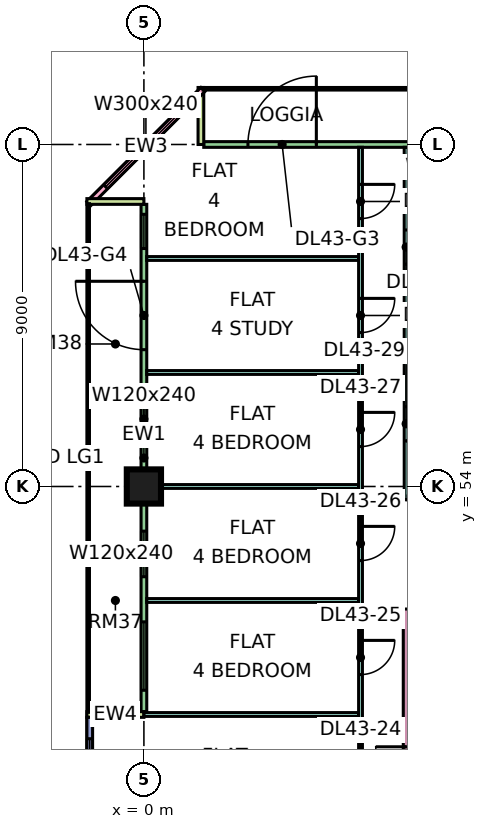
"""IFC4 building model, lengths in metres.
Left out: names, types, materials, properties, quantities, classifications, styles, units other than length and angle.
Written with IfcOpenShell. Run it as: python <this file> out.ifc"""

import sys

from ifc_helpers import new_model, si_unit, direction, frame, frame_2d, origin, origin_2d, place, context, subcontext, project, spatial, rectangle, extrude, element, fill, save


model = new_model("IFC4")
c1 = context("Model", 3, precision=1e-05, world=origin(), true_north=direction((0.0, 1.0)))
c2 = subcontext(c1, "Body", "Model", "MODEL_VIEW")
j1 = project(units=[si_unit("LENGTHUNIT", "METRE"), si_unit("PLANEANGLEUNIT", "RADIAN")], contexts=[c1])
p1 = place(None, origin())
s1 = spatial("IfcSite", under=j1, at=p1, CompositionType="ELEMENT")
p2 = place(p1, origin())
s2 = spatial("IfcBuilding", under=s1, at=p2, CompositionType="ELEMENT")
p3 = place(p2, frame((0.0, 0.0, 187.4)))
s3 = spatial("IfcBuildingStorey", under=s2, at=p3, CompositionType="ELEMENT", Elevation=187.4)
p4 = place(p3, frame((0.0, 54.0, 0.0), z_axis=(0.0, 0.0, 1.0), x_axis=(1.0, 0.0, 0.0)))
e1 = element("IfcColumn", 1, at=p4, inside=s3, PredefinedType="COLUMN", context=c2, shape_type="SweptSolid", body=[
    extrude(rectangle(XDim=0.9, YDim=0.9, at=origin_2d()), origin(), (0.0, 0.0, 1.0), 3.75),
])
p5 = place(p3, frame((11.925, 63.0, 0.0), z_axis=(0.0, 0.0, 1.0), x_axis=(-1.0, 0.0, 0.0)))
e2 = element("IfcWall", 2, at=p5, inside=s3, PredefinedType="SOLIDWALL", context=c2, shape_type="SweptSolid", body=[
    extrude(rectangle(XDim=10.35, YDim=0.15, at=frame_2d((5.175, 0.0))), origin(), (0.0, 0.0, 1.0), 3.35),
])
p6 = place(p5, frame((2.775, 0.0, 0.45)))
e3 = element("IfcOpeningElement", 3, at=p6, cuts=e2, PredefinedType="OPENING", context=c2, shape_type="SweptSolid", body=[
    extrude(rectangle(XDim=1.8, YDim=2.4, at=frame_2d((0.9, 1.2))), frame((0.0, 0.085, 0.0), z_axis=(0.0, -1.0, 0.0), x_axis=(1.0, 0.0, 0.0)), (0.0, 0.0, 1.0), 0.17),
])
p7 = place(p5, frame((7.387, 0.0, 0.0)))
e4 = element("IfcOpeningElement", 4, at=p7, cuts=e2, PredefinedType="OPENING", context=c2, shape_type="SweptSolid", body=[
    extrude(rectangle(XDim=1.8, YDim=2.4, at=frame_2d((0.9, 1.2))), frame((0.0, 0.085, 0.0), z_axis=(0.0, -1.0, 0.0), x_axis=(1.0, 0.0, 0.0)), (0.0, 0.0, 1.0), 0.17),
])
p8 = place(p3, frame((1.5, 64.5, 0.0), z_axis=(0.0, 0.0, 1.0), x_axis=(0.0, -1.0, 0.0)))
e5 = element("IfcWall", 5, at=p8, inside=s3, PredefinedType="SOLIDWALL", context=c2, shape_type="SweptSolid", body=[
    extrude(rectangle(XDim=1.5, YDim=0.15, at=frame_2d((0.75, 0.0))), origin(), (0.0, 0.0, 1.0), 3.35),
])
p9 = place(p3, frame((1.553, 64.447, 0.0), z_axis=(0.0, 0.0, 1.0), x_axis=(-0.707106781187, -0.707106781187, 0.0)))
e6 = element("IfcWall", 6, at=p9, inside=s3, PredefinedType="SOLIDWALL", context=c2, shape_type="SweptSolid", body=[
    extrude(rectangle(XDim=4.243, YDim=0.15, at=frame_2d((2.121, 0.0))), origin(), (0.0, 0.0, 1.0), 3.35),
])
p10 = place(p9, frame((0.621, 0.0, 0.45)))
e7 = element("IfcOpeningElement", 7, at=p10, cuts=e6, PredefinedType="OPENING", context=c2, shape_type="SweptSolid", body=[
    extrude(rectangle(XDim=3.0, YDim=2.4, at=frame_2d((1.5, 1.2))), frame((0.0, 0.085, 0.0), z_axis=(0.0, -1.0, 0.0), x_axis=(1.0, 0.0, 0.0)), (0.0, 0.0, 1.0), 0.17),
])
p11 = place(p3, frame((0.0, 61.425, 0.0), z_axis=(0.0, 0.0, 1.0), x_axis=(0.0, -1.0, 0.0)))
e8 = element("IfcWall", 8, at=p11, inside=s3, PredefinedType="SOLIDWALL", context=c2, shape_type="SweptSolid", body=[
    extrude(rectangle(XDim=13.35, YDim=0.15, at=frame_2d((6.675, 0.0))), origin(), (0.0, 0.0, 1.0), 3.35),
])
p12 = place(p11, frame((0.262, 0.0, 0.45)))
e9 = element("IfcOpeningElement", 9, at=p12, cuts=e8, PredefinedType="OPENING", context=c2, shape_type="SweptSolid", body=[
    extrude(rectangle(XDim=0.9, YDim=2.4, at=frame_2d((0.45, 1.2))), frame((0.0, 0.085, 0.0), z_axis=(0.0, -1.0, 0.0), x_axis=(1.0, 0.0, 0.0)), (0.0, 0.0, 1.0), 0.17),
])
p13 = place(p11, frame((2.025, 0.0, 0.0)))
e10 = element("IfcOpeningElement", 10, at=p13, cuts=e8, PredefinedType="OPENING", context=c2, shape_type="SweptSolid", body=[
    extrude(rectangle(XDim=1.8, YDim=2.4, at=frame_2d((0.9, 1.2))), frame((0.0, 0.085, 0.0), z_axis=(0.0, -1.0, 0.0), x_axis=(1.0, 0.0, 0.0)), (0.0, 0.0, 1.0), 0.17),
])
p14 = place(p11, frame((5.05, 0.0, 0.45)))
e11 = element("IfcOpeningElement", 11, at=p14, cuts=e8, PredefinedType="OPENING", context=c2, shape_type="SweptSolid", body=[
    extrude(rectangle(XDim=1.2, YDim=2.4, at=frame_2d((0.6, 1.2))), frame((0.0, 0.085, 0.0), z_axis=(0.0, -1.0, 0.0), x_axis=(1.0, 0.0, 0.0)), (0.0, 0.0, 1.0), 0.17),
])
p15 = place(p11, frame((8.6, 0.0, 0.45)))
e12 = element("IfcOpeningElement", 12, at=p15, cuts=e8, PredefinedType="OPENING", context=c2, shape_type="SweptSolid", body=[
    extrude(rectangle(XDim=1.2, YDim=2.4, at=frame_2d((0.6, 1.2))), frame((0.0, 0.085, 0.0), z_axis=(0.0, -1.0, 0.0), x_axis=(1.0, 0.0, 0.0)), (0.0, 0.0, 1.0), 0.17),
])
p16 = place(p11, frame((10.988, 0.0, 0.45)))
e13 = element("IfcOpeningElement", 13, at=p16, cuts=e8, PredefinedType="OPENING", context=c2, shape_type="SweptSolid", body=[
    extrude(rectangle(XDim=1.8, YDim=2.4, at=frame_2d((0.9, 1.2))), frame((0.0, 0.085, 0.0), z_axis=(0.0, -1.0, 0.0), x_axis=(1.0, 0.0, 0.0)), (0.0, 0.0, 1.0), 0.17),
])
for number, where, z_axis, x_axis in (
    (14, (-1.5, 61.5, 0.0), (0.0, 0.0, 1.0), (1.0, 0.0, 0.0)),
    (15, (-1.5, 48.0, 0.0), (0.0, 0.0, 1.0), (1.0, 0.0, 0.0)),
):
    element("IfcWall", number, at=place(p3, frame(where, z_axis=z_axis, x_axis=x_axis)), inside=s3, PredefinedType="SOLIDWALL", context=c2, shape_type="SweptSolid", body=[
        extrude(rectangle(XDim=1.5, YDim=0.15, at=frame_2d((0.75, 0.0))), origin(), (0.0, 0.0, 1.0), 3.35),
    ])
p17 = place(p3, frame((-1.425, 47.925, 0.0), z_axis=(0.0, 0.0, 1.0), x_axis=(0.0, -1.0, 0.0)))
e16 = element("IfcWall", 16, at=p17, inside=s3, PredefinedType="SOLIDWALL", context=c2, shape_type="SweptSolid", body=[
    extrude(rectangle(XDim=11.85, YDim=0.15, at=frame_2d((5.925, 0.0))), origin(), (0.0, 0.0, 1.0), 3.35),
])
p18 = place(p17, frame((0.562, 0.0, 0.45)))
e17 = element("IfcOpeningElement", 17, at=p18, cuts=e16, PredefinedType="OPENING", context=c2, shape_type="SweptSolid", body=[
    extrude(rectangle(XDim=1.8, YDim=2.4, at=frame_2d((0.9, 1.2))), frame((0.0, 0.085, 0.0), z_axis=(0.0, -1.0, 0.0), x_axis=(1.0, 0.0, 0.0)), (0.0, 0.0, 1.0), 0.17),
])
p19 = place(p17, frame((5.887, 0.0, 0.45)))
e18 = element("IfcOpeningElement", 18, at=p19, cuts=e16, PredefinedType="OPENING", context=c2, shape_type="SweptSolid", body=[
    extrude(rectangle(XDim=3.0, YDim=2.4, at=frame_2d((1.5, 1.2))), frame((0.0, 0.085, 0.0), z_axis=(0.0, -1.0, 0.0), x_axis=(1.0, 0.0, 0.0)), (0.0, 0.0, 1.0), 0.17),
])
p20 = place(p3, frame((0.0, 48.0, 0.0), z_axis=(0.0, 0.0, 1.0), x_axis=(1.0, 0.0, 0.0)))
e19 = element("IfcWall", 19, at=p20, inside=s3, PredefinedType="PARTITIONING", context=c2, shape_type="SweptSolid", body=[
    extrude(rectangle(XDim=5.65, YDim=0.1, at=frame_2d((2.825, 0.0))), origin(), (0.0, 0.0, 1.0), 3.35),
])
for number, where, z_axis, x_axis in (
    (20, (0.074, 51.0, 0.0), (0.0, 0.0, 1.0), (1.0, 0.0, 0.0)),
    (21, (0.074, 54.0, 0.0), (0.0, 0.0, 1.0), (1.0, 0.0, 0.0)),
    (22, (0.074, 57.0, 0.0), (0.0, 0.0, 1.0), (1.0, 0.0, 0.0)),
    (23, (0.074, 60.0, 0.0), (0.0, 0.0, 1.0), (1.0, 0.0, 0.0)),
):
    element("IfcWall", number, at=place(p3, frame(where, z_axis=z_axis, x_axis=x_axis)), inside=s3, PredefinedType="PARTITIONING", context=c2, shape_type="SweptSolid", body=[
        extrude(rectangle(XDim=5.576, YDim=0.1, at=frame_2d((2.788, 0.0))), origin(), (0.0, 0.0, 1.0), 3.35),
    ])
p21 = place(p3, frame((5.7, 36.1, 0.0), z_axis=(0.0, 0.0, 1.0), x_axis=(0.0, 1.0, 0.0)))
e24 = element("IfcWall", 24, at=p21, inside=s3, PredefinedType="PARTITIONING", context=c2, shape_type="SweptSolid", body=[
    extrude(rectangle(XDim=26.826, YDim=0.1, at=frame_2d((13.413, 0.0))), origin(), (0.0, 0.0, 1.0), 3.35),
])
p22 = place(p21, frame((9.95, 0.0, 0.0)))
e25 = element("IfcOpeningElement", 25, at=p22, cuts=e24, PredefinedType="OPENING", context=c2, shape_type="SweptSolid", body=[
    extrude(rectangle(XDim=0.9, YDim=2.1, at=frame_2d((0.45, 1.05))), frame((0.0, 0.06, 0.0), z_axis=(0.0, -1.0, 0.0), x_axis=(1.0, 0.0, 0.0)), (0.0, 0.0, 1.0), 0.12),
])
p23 = place(p21, frame((12.95, 0.0, 0.0)))
e26 = element("IfcOpeningElement", 26, at=p23, cuts=e24, PredefinedType="OPENING", context=c2, shape_type="SweptSolid", body=[
    extrude(rectangle(XDim=0.9, YDim=2.1, at=frame_2d((0.45, 1.05))), frame((0.0, 0.06, 0.0), z_axis=(0.0, -1.0, 0.0), x_axis=(1.0, 0.0, 0.0)), (0.0, 0.0, 1.0), 0.12),
])
p24 = place(p21, frame((15.95, 0.0, 0.0)))
e27 = element("IfcOpeningElement", 27, at=p24, cuts=e24, PredefinedType="OPENING", context=c2, shape_type="SweptSolid", body=[
    extrude(rectangle(XDim=0.9, YDim=2.1, at=frame_2d((0.45, 1.05))), frame((0.0, 0.06, 0.0), z_axis=(0.0, -1.0, 0.0), x_axis=(1.0, 0.0, 0.0)), (0.0, 0.0, 1.0), 0.12),
])
p25 = place(p21, frame((18.95, 0.0, 0.0)))
e28 = element("IfcOpeningElement", 28, at=p25, cuts=e24, PredefinedType="OPENING", context=c2, shape_type="SweptSolid", body=[
    extrude(rectangle(XDim=0.9, YDim=2.1, at=frame_2d((0.45, 1.05))), frame((0.0, 0.06, 0.0), z_axis=(0.0, -1.0, 0.0), x_axis=(1.0, 0.0, 0.0)), (0.0, 0.0, 1.0), 0.12),
])
p26 = place(p21, frame((24.95, 0.0, 0.0)))
e29 = element("IfcOpeningElement", 29, at=p26, cuts=e24, PredefinedType="OPENING", context=c2, shape_type="SweptSolid", body=[
    extrude(rectangle(XDim=0.9, YDim=2.1, at=frame_2d((0.45, 1.05))), frame((0.0, 0.06, 0.0), z_axis=(0.0, -1.0, 0.0), x_axis=(1.0, 0.0, 0.0)), (0.0, 0.0, 1.0), 0.12),
])
p27 = place(p21, frame((3.95, 0.0, 0.0)))
e30 = element("IfcOpeningElement", 30, at=p27, cuts=e24, PredefinedType="OPENING", context=c2, shape_type="SweptSolid", body=[
    extrude(rectangle(XDim=0.9, YDim=2.1, at=frame_2d((0.45, 1.05))), frame((0.0, 0.06, 0.0), z_axis=(0.0, -1.0, 0.0), x_axis=(1.0, 0.0, 0.0)), (0.0, 0.0, 1.0), 0.12),
])
p28 = place(p21, frame((21.95, 0.0, 0.0)))
e31 = element("IfcOpeningElement", 31, at=p28, cuts=e24, PredefinedType="OPENING", context=c2, shape_type="SweptSolid", body=[
    extrude(rectangle(XDim=0.9, YDim=2.1, at=frame_2d((0.45, 1.05))), frame((0.0, 0.06, 0.0), z_axis=(0.0, -1.0, 0.0), x_axis=(1.0, 0.0, 0.0)), (0.0, 0.0, 1.0), 0.12),
])
p29 = place(p3, frame((6.9, 36.1, 0.0), z_axis=(0.0, 0.0, 1.0), x_axis=(0.0, 1.0, 0.0)))
e32 = element("IfcWall", 32, at=p29, inside=s3, PredefinedType="PARTITIONING", context=c2, shape_type="SweptSolid", body=[
    extrude(rectangle(XDim=14.675, YDim=0.15, at=frame_2d((7.337, 0.0))), origin(), (0.0, 0.0, 1.0), 3.35),
])
p30 = place(p29, frame((7.55, 0.0, 0.0)))
e33 = element("IfcOpeningElement", 33, at=p30, cuts=e32, PredefinedType="OPENING", context=c2, shape_type="SweptSolid", body=[
    extrude(rectangle(XDim=0.8, YDim=2.1, at=frame_2d((0.4, 1.05))), frame((0.0, 0.085, 0.0), z_axis=(0.0, -1.0, 0.0), x_axis=(1.0, 0.0, 0.0)), (0.0, 0.0, 1.0), 0.17),
])
p31 = place(p29, frame((0.65, 0.0, 0.0)))
e34 = element("IfcOpeningElement", 34, at=p31, cuts=e32, PredefinedType="OPENING", context=c2, shape_type="SweptSolid", body=[
    extrude(rectangle(XDim=0.8, YDim=2.1, at=frame_2d((0.4, 1.05))), frame((0.0, 0.085, 0.0), z_axis=(0.0, -1.0, 0.0), x_axis=(1.0, 0.0, 0.0)), (0.0, 0.0, 1.0), 0.17),
])
p32 = place(p29, frame((10.25, 0.0, 0.0)))
e35 = element("IfcOpeningElement", 35, at=p32, cuts=e32, PredefinedType="OPENING", context=c2, shape_type="SweptSolid", body=[
    extrude(rectangle(XDim=0.8, YDim=2.1, at=frame_2d((0.4, 1.05))), frame((0.0, 0.085, 0.0), z_axis=(0.0, -1.0, 0.0), x_axis=(1.0, 0.0, 0.0)), (0.0, 0.0, 1.0), 0.17),
])
p33 = place(p29, frame((3.95, 0.0, 0.0)))
e36 = element("IfcOpeningElement", 36, at=p33, cuts=e32, PredefinedType="OPENING", context=c2, shape_type="SweptSolid", body=[
    extrude(rectangle(XDim=0.9, YDim=2.1, at=frame_2d((0.45, 1.05))), frame((0.0, 0.085, 0.0), z_axis=(0.0, -1.0, 0.0), x_axis=(1.0, 0.0, 0.0)), (0.0, 0.0, 1.0), 0.17),
])
p34 = place(p3, frame((6.9, 53.65, 0.0), z_axis=(0.0, 0.0, 1.0), x_axis=(0.0, 1.0, 0.0)))
e37 = element("IfcWall", 37, at=p34, inside=s3, PredefinedType="PARTITIONING", context=c2, shape_type="SweptSolid", body=[
    extrude(rectangle(XDim=9.276, YDim=0.1, at=frame_2d((4.638, 0.0))), origin(), (0.0, 0.0, 1.0), 3.35),
])
p35 = place(p34, frame((1.55, 0.0, 0.0)))
e38 = element("IfcOpeningElement", 38, at=p35, cuts=e37, PredefinedType="OPENING", context=c2, shape_type="SweptSolid", body=[
    extrude(rectangle(XDim=0.9, YDim=2.1, at=frame_2d((0.45, 1.05))), frame((0.0, 0.06, 0.0), z_axis=(0.0, -1.0, 0.0), x_axis=(1.0, 0.0, 0.0)), (0.0, 0.0, 1.0), 0.12),
])
p36 = place(p34, frame((6.2, 0.0, 0.0)))
e39 = element("IfcOpeningElement", 39, at=p36, cuts=e37, PredefinedType="OPENING", context=c2, shape_type="SweptSolid", body=[
    extrude(rectangle(XDim=0.9, YDim=2.1, at=frame_2d((0.45, 1.05))), frame((0.0, 0.06, 0.0), z_axis=(0.0, -1.0, 0.0), x_axis=(1.0, 0.0, 0.0)), (0.0, 0.0, 1.0), 0.12),
])
p37 = place(p7, frame((1.8, 0.0, 0.0), z_axis=(0.0, 0.0, 1.0), x_axis=(-1.0, 0.0, 0.0)))
e40 = element("IfcDoor", 40, at=p37, inside=s3, OperationType="DOUBLE_DOOR_SINGLE_SWING", PredefinedType="DOOR", context=c2, shape_type="SweptSolid", body=[
    extrude(rectangle(XDim=1.8, YDim=2.4, at=frame_2d((0.9, 1.2))), frame((0.0, 0.025, 0.0), z_axis=(0.0, -1.0, 0.0), x_axis=(1.0, 0.0, 0.0)), (0.0, 0.0, 1.0), 0.05),
])
fill(e4, e40)
p38 = place(p10, origin())
e41 = element("IfcWindow", 41, at=p38, inside=s3, PartitioningType="SINGLE_PANEL", PredefinedType="WINDOW", context=c2, shape_type="SweptSolid", body=[
    extrude(rectangle(XDim=3.0, YDim=2.4, at=frame_2d((1.5, 1.2))), frame((0.0, 0.03, 0.0), z_axis=(0.0, -1.0, 0.0), x_axis=(1.0, 0.0, 0.0)), (0.0, 0.0, 1.0), 0.06),
])
fill(e7, e41)
p39 = place(p12, origin())
e42 = element("IfcWindow", 42, at=p39, inside=s3, PartitioningType="SINGLE_PANEL", PredefinedType="WINDOW", context=c2, shape_type="SweptSolid", body=[
    extrude(rectangle(XDim=0.9, YDim=2.4, at=frame_2d((0.45, 1.2))), frame((0.0, 0.03, 0.0), z_axis=(0.0, -1.0, 0.0), x_axis=(1.0, 0.0, 0.0)), (0.0, 0.0, 1.0), 0.06),
])
fill(e9, e42)
p40 = place(p13, frame((1.8, 0.0, 0.0), z_axis=(0.0, 0.0, 1.0), x_axis=(-1.0, 0.0, 0.0)))
e43 = element("IfcDoor", 43, at=p40, inside=s3, OperationType="DOUBLE_DOOR_SINGLE_SWING", PredefinedType="DOOR", context=c2, shape_type="SweptSolid", body=[
    extrude(rectangle(XDim=1.8, YDim=2.4, at=frame_2d((0.9, 1.2))), frame((0.0, 0.025, 0.0), z_axis=(0.0, -1.0, 0.0), x_axis=(1.0, 0.0, 0.0)), (0.0, 0.0, 1.0), 0.05),
])
fill(e10, e43)
p41 = place(p14, origin())
e44 = element("IfcWindow", 44, at=p41, inside=s3, PartitioningType="SINGLE_PANEL", PredefinedType="WINDOW", context=c2, shape_type="SweptSolid", body=[
    extrude(rectangle(XDim=1.2, YDim=2.4, at=frame_2d((0.6, 1.2))), frame((0.0, 0.03, 0.0), z_axis=(0.0, -1.0, 0.0), x_axis=(1.0, 0.0, 0.0)), (0.0, 0.0, 1.0), 0.06),
])
fill(e11, e44)
p42 = place(p15, origin())
e45 = element("IfcWindow", 45, at=p42, inside=s3, PartitioningType="SINGLE_PANEL", PredefinedType="WINDOW", context=c2, shape_type="SweptSolid", body=[
    extrude(rectangle(XDim=1.2, YDim=2.4, at=frame_2d((0.6, 1.2))), frame((0.0, 0.03, 0.0), z_axis=(0.0, -1.0, 0.0), x_axis=(1.0, 0.0, 0.0)), (0.0, 0.0, 1.0), 0.06),
])
fill(e12, e45)
p43 = place(p16, origin())
e46 = element("IfcWindow", 46, at=p43, inside=s3, PartitioningType="SINGLE_PANEL", PredefinedType="WINDOW", context=c2, shape_type="SweptSolid", body=[
    extrude(rectangle(XDim=1.8, YDim=2.4, at=frame_2d((0.9, 1.2))), frame((0.0, 0.03, 0.0), z_axis=(0.0, -1.0, 0.0), x_axis=(1.0, 0.0, 0.0)), (0.0, 0.0, 1.0), 0.06),
])
fill(e13, e46)
p44 = place(p18, origin())
e47 = element("IfcWindow", 47, at=p44, inside=s3, PartitioningType="SINGLE_PANEL", PredefinedType="WINDOW", context=c2, shape_type="SweptSolid", body=[
    extrude(rectangle(XDim=1.8, YDim=2.4, at=frame_2d((0.9, 1.2))), frame((0.0, 0.03, 0.0), z_axis=(0.0, -1.0, 0.0), x_axis=(1.0, 0.0, 0.0)), (0.0, 0.0, 1.0), 0.06),
])
fill(e17, e47)
p45 = place(p23, origin())
e48 = element("IfcDoor", 48, at=p45, inside=s3, OperationType="SINGLE_SWING_RIGHT", PredefinedType="DOOR", context=c2, shape_type="SweptSolid", body=[
    extrude(rectangle(XDim=0.9, YDim=2.1, at=frame_2d((0.45, 1.05))), frame((0.0, 0.025, 0.0), z_axis=(0.0, -1.0, 0.0), x_axis=(1.0, 0.0, 0.0)), (0.0, 0.0, 1.0), 0.05),
])
fill(e26, e48)
p46 = place(p24, origin())
e49 = element("IfcDoor", 49, at=p46, inside=s3, OperationType="SINGLE_SWING_RIGHT", PredefinedType="DOOR", context=c2, shape_type="SweptSolid", body=[
    extrude(rectangle(XDim=0.9, YDim=2.1, at=frame_2d((0.45, 1.05))), frame((0.0, 0.025, 0.0), z_axis=(0.0, -1.0, 0.0), x_axis=(1.0, 0.0, 0.0)), (0.0, 0.0, 1.0), 0.05),
])
fill(e27, e49)
p47 = place(p25, origin())
e50 = element("IfcDoor", 50, at=p47, inside=s3, OperationType="SINGLE_SWING_RIGHT", PredefinedType="DOOR", context=c2, shape_type="SweptSolid", body=[
    extrude(rectangle(XDim=0.9, YDim=2.1, at=frame_2d((0.45, 1.05))), frame((0.0, 0.025, 0.0), z_axis=(0.0, -1.0, 0.0), x_axis=(1.0, 0.0, 0.0)), (0.0, 0.0, 1.0), 0.05),
])
fill(e28, e50)
p48 = place(p26, origin())
e51 = element("IfcDoor", 51, at=p48, inside=s3, OperationType="SINGLE_SWING_RIGHT", PredefinedType="DOOR", context=c2, shape_type="SweptSolid", body=[
    extrude(rectangle(XDim=0.9, YDim=2.1, at=frame_2d((0.45, 1.05))), frame((0.0, 0.025, 0.0), z_axis=(0.0, -1.0, 0.0), x_axis=(1.0, 0.0, 0.0)), (0.0, 0.0, 1.0), 0.05),
])
fill(e29, e51)
p49 = place(p35, frame((0.9, 0.0, 0.0), z_axis=(0.0, 0.0, 1.0), x_axis=(-1.0, 0.0, 0.0)))
e52 = element("IfcDoor", 52, at=p49, inside=s3, OperationType="SINGLE_SWING_LEFT", PredefinedType="DOOR", context=c2, shape_type="SweptSolid", body=[
    extrude(rectangle(XDim=0.9, YDim=2.1, at=frame_2d((0.45, 1.05))), frame((0.0, 0.025, 0.0), z_axis=(0.0, -1.0, 0.0), x_axis=(1.0, 0.0, 0.0)), (0.0, 0.0, 1.0), 0.05),
])
fill(e38, e52)
p50 = place(p36, frame((0.9, 0.0, 0.0), z_axis=(0.0, 0.0, 1.0), x_axis=(-1.0, 0.0, 0.0)))
e53 = element("IfcDoor", 53, at=p50, inside=s3, OperationType="SINGLE_SWING_LEFT", PredefinedType="DOOR", context=c2, shape_type="SweptSolid", body=[
    extrude(rectangle(XDim=0.9, YDim=2.1, at=frame_2d((0.45, 1.05))), frame((0.0, 0.025, 0.0), z_axis=(0.0, -1.0, 0.0), x_axis=(1.0, 0.0, 0.0)), (0.0, 0.0, 1.0), 0.05),
])
fill(e39, e53)
p51 = place(p32, frame((0.8, 0.0, 0.0), z_axis=(0.0, 0.0, 1.0), x_axis=(-1.0, 0.0, 0.0)))
e54 = element("IfcDoor", 54, at=p51, inside=s3, OperationType="SINGLE_SWING_RIGHT", PredefinedType="DOOR", context=c2, shape_type="SweptSolid", body=[
    extrude(rectangle(XDim=0.8, YDim=2.1, at=frame_2d((0.4, 1.05))), frame((0.0, 0.025, 0.0), z_axis=(0.0, -1.0, 0.0), x_axis=(1.0, 0.0, 0.0)), (0.0, 0.0, 1.0), 0.05),
])
fill(e35, e54)
p52 = place(p28, origin())
e55 = element("IfcDoor", 55, at=p52, inside=s3, OperationType="SINGLE_SWING_RIGHT", PredefinedType="DOOR", context=c2, shape_type="SweptSolid", body=[
    extrude(rectangle(XDim=0.9, YDim=2.1, at=frame_2d((0.45, 1.05))), frame((0.0, 0.025, 0.0), z_axis=(0.0, -1.0, 0.0), x_axis=(1.0, 0.0, 0.0)), (0.0, 0.0, 1.0), 0.05),
])
fill(e31, e55)
save(model, sys.argv[1])
